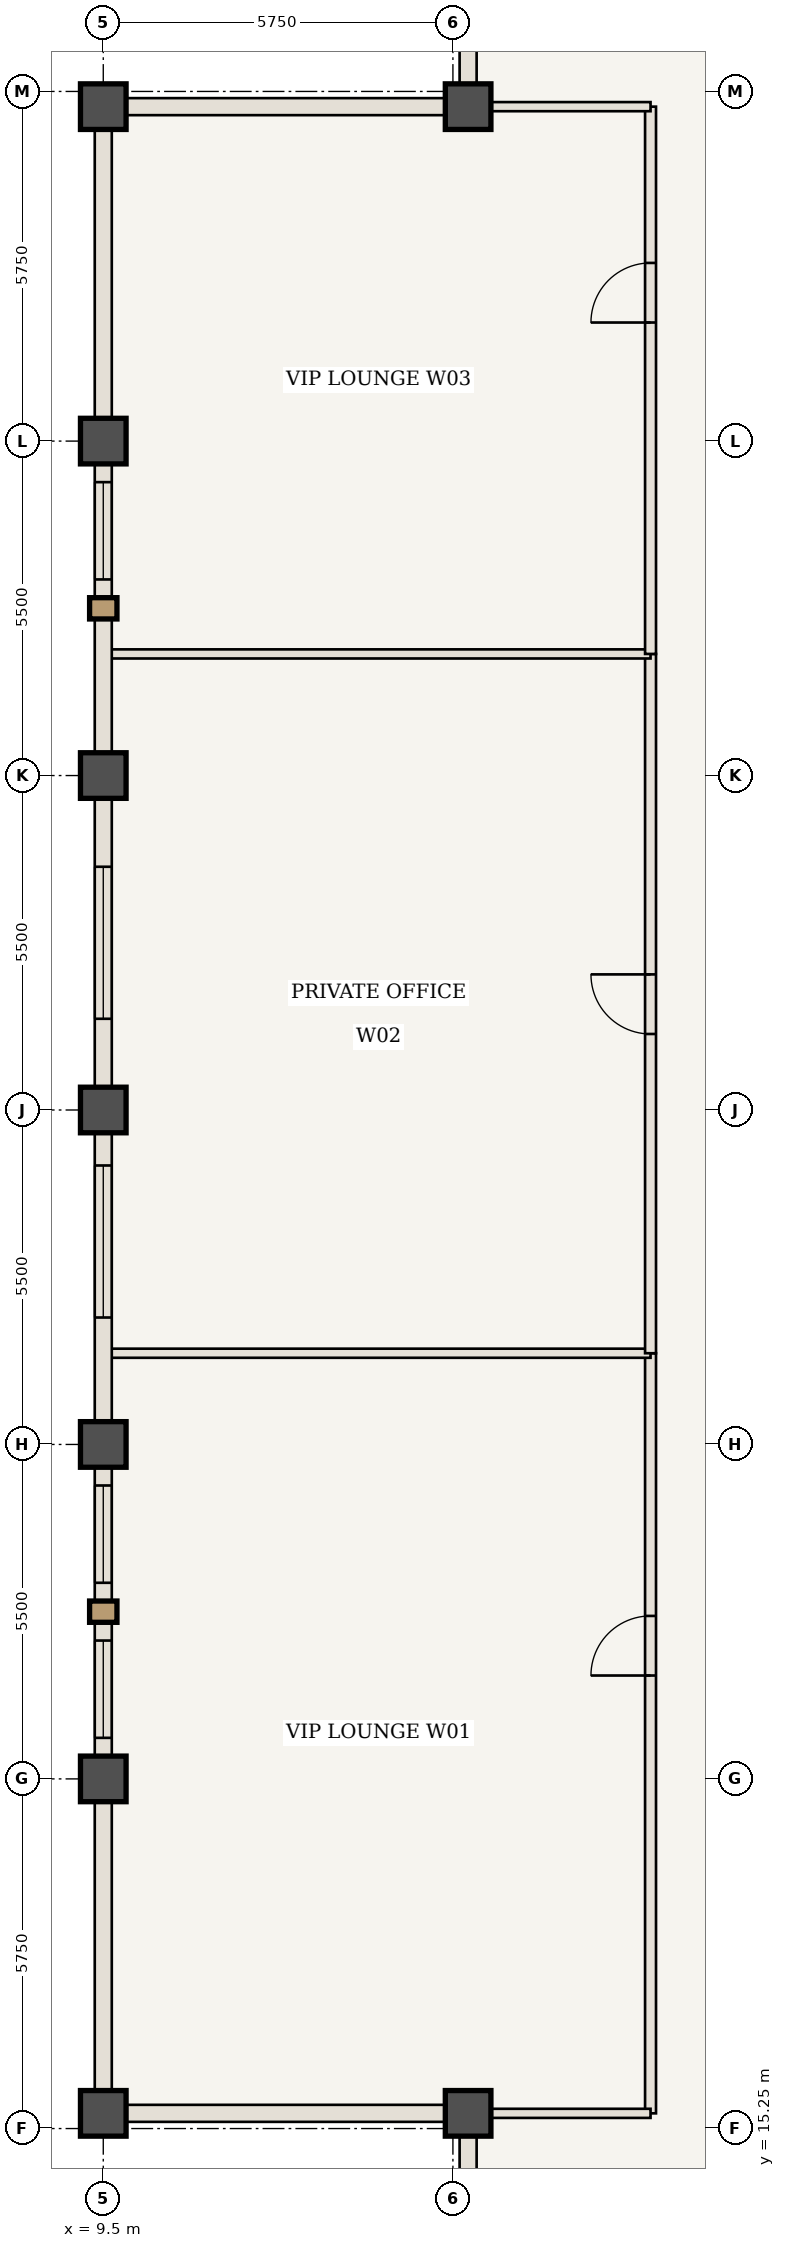
"""IFC4 building model, lengths in metres.
Left out: names, types, materials, properties, quantities, classifications, styles, units other than length and angle.
Written with IfcOpenShell. Run it as: python <this file> out.ifc"""

import sys

from ifc_helpers import new_model, si_unit, direction, frame, frame_2d, origin, origin_2d, place, context, subcontext, project, spatial, rectangle, extrude, element, fill, save


model = new_model("IFC4")
c1 = context("Model", 3, precision=1e-05, world=origin(), true_north=direction((0.0, 1.0)))
c2 = subcontext(c1, "Body", "Model", "MODEL_VIEW")
j1 = project(units=[si_unit("LENGTHUNIT", "METRE"), si_unit("PLANEANGLEUNIT", "RADIAN")], contexts=[c1])
p1 = place(None, origin())
s1 = spatial("IfcSite", under=j1, at=p1, CompositionType="ELEMENT")
p2 = place(p1, origin())
s2 = spatial("IfcBuilding", under=s1, at=p2, CompositionType="ELEMENT")
p3 = place(p2, frame((0.0, 0.0, 281.4)))
s3 = spatial("IfcBuildingStorey", under=s2, at=p3, CompositionType="ELEMENT", Elevation=281.4)
for number, where, z_axis, x_axis in (
    (1, (15.5, 15.5, 0.0), (0.0, 0.0, 1.0), (1.0, 0.0, 0.0)),
    (2, (9.5, 15.5, 0.0), (0.0, 0.0, 1.0), (1.0, 0.0, 0.0)),
    (3, (15.5, 48.5, 0.0), (0.0, 0.0, 1.0), (1.0, 0.0, 0.0)),
    (4, (9.5, 48.5, 0.0), (0.0, 0.0, 1.0), (1.0, 0.0, 0.0)),
    (5, (9.5, 21.0, 0.0), (0.0, 0.0, 1.0), (1.0, 0.0, 0.0)),
    (6, (9.5, 26.5, 0.0), (0.0, 0.0, 1.0), (1.0, 0.0, 0.0)),
    (7, (9.5, 32.0, 0.0), (0.0, 0.0, 1.0), (1.0, 0.0, 0.0)),
    (8, (9.5, 37.5, 0.0), (0.0, 0.0, 1.0), (1.0, 0.0, 0.0)),
    (9, (9.5, 43.0, 0.0), (0.0, 0.0, 1.0), (1.0, 0.0, 0.0)),
):
    element("IfcColumn", number, at=place(p3, frame(where, z_axis=z_axis, x_axis=x_axis)), inside=s3, PredefinedType="COLUMN", context=c2, shape_type="SweptSolid", body=[
        extrude(rectangle(XDim=0.75, YDim=0.75, at=origin_2d()), origin(), (0.0, 0.0, 1.0), 3.85),
    ])
p4 = place(p3, frame((18.5, 15.5, 0.0), z_axis=(0.0, 0.0, 1.0), x_axis=(0.0, 1.0, 0.0)))
e10 = element("IfcWall", 10, at=p4, inside=s3, PredefinedType="STANDARD", context=c2, shape_type="SweptSolid", body=[
    extrude(rectangle(XDim=12.5, YDim=0.18, at=frame_2d((6.25, 0.0))), origin(), (0.0, 0.0, 1.0), 3.685),
])
p5 = place(p4, frame((7.2, 0.0, 0.0)))
e11 = element("IfcOpeningElement", 11, at=p5, cuts=e10, PredefinedType="OPENING", context=c2, shape_type="SweptSolid", body=[
    extrude(rectangle(XDim=0.98, YDim=2.2, at=frame_2d((0.49, 1.1))), frame((0.0, 0.1, 0.0), z_axis=(0.0, -1.0, 0.0), x_axis=(1.0, 0.0, 0.0)), (0.0, 0.0, 1.0), 0.2),
])
p6 = place(p3, frame((9.56, 28.0, 0.0), z_axis=(0.0, 0.0, 1.0), x_axis=(1.0, 0.0, 0.0)))
e12 = element("IfcWall", 12, at=p6, inside=s3, PredefinedType="STANDARD", context=c2, shape_type="SweptSolid", body=[
    extrude(rectangle(XDim=8.94, YDim=0.15, at=frame_2d((4.47, 0.0))), origin(), (0.0, 0.0, 1.0), 3.685),
])
p7 = place(p3, frame((18.5, 28.0, 0.0), z_axis=(0.0, 0.0, 1.0), x_axis=(0.0, 1.0, 0.0)))
e13 = element("IfcWall", 13, at=p7, inside=s3, PredefinedType="STANDARD", context=c2, shape_type="SweptSolid", body=[
    extrude(rectangle(XDim=11.5, YDim=0.18, at=frame_2d((5.75, 0.0))), origin(), (0.0, 0.0, 1.0), 3.685),
])
p8 = place(p7, frame((5.25, 0.0, 0.0)))
e14 = element("IfcOpeningElement", 14, at=p8, cuts=e13, PredefinedType="OPENING", context=c2, shape_type="SweptSolid", body=[
    extrude(rectangle(XDim=0.98, YDim=2.2, at=frame_2d((0.49, 1.1))), frame((0.0, 0.1, 0.0), z_axis=(0.0, -1.0, 0.0), x_axis=(1.0, 0.0, 0.0)), (0.0, 0.0, 1.0), 0.2),
])
p9 = place(p3, frame((9.56, 39.5, 0.0), z_axis=(0.0, 0.0, 1.0), x_axis=(1.0, 0.0, 0.0)))
e15 = element("IfcWall", 15, at=p9, inside=s3, PredefinedType="STANDARD", context=c2, shape_type="SweptSolid", body=[
    extrude(rectangle(XDim=8.94, YDim=0.15, at=frame_2d((4.47, 0.0))), origin(), (0.0, 0.0, 1.0), 3.685),
])
p10 = place(p3, frame((18.5, 39.5, 0.0), z_axis=(0.0, 0.0, 1.0), x_axis=(0.0, 1.0, 0.0)))
e16 = element("IfcWall", 16, at=p10, inside=s3, PredefinedType="STANDARD", context=c2, shape_type="SweptSolid", body=[
    extrude(rectangle(XDim=9.0, YDim=0.18, at=frame_2d((4.5, 0.0))), origin(), (0.0, 0.0, 1.0), 3.685),
])
p11 = place(p10, frame((5.45, 0.0, 0.0)))
e17 = element("IfcOpeningElement", 17, at=p11, cuts=e16, PredefinedType="OPENING", context=c2, shape_type="SweptSolid", body=[
    extrude(rectangle(XDim=0.98, YDim=2.2, at=frame_2d((0.49, 1.1))), frame((0.0, 0.1, 0.0), z_axis=(0.0, -1.0, 0.0), x_axis=(1.0, 0.0, 0.0)), (0.0, 0.0, 1.0), 0.2),
])
for number, where, z_axis, x_axis in (
    (18, (15.5, 15.5, 0.0), (0.0, 0.0, 1.0), (1.0, 0.0, 0.0)),
    (19, (15.5, 48.5, 0.0), (0.0, 0.0, 1.0), (1.0, 0.0, 0.0)),
):
    element("IfcWall", number, at=place(p3, frame(where, z_axis=z_axis, x_axis=x_axis)), inside=s3, PredefinedType="STANDARD", context=c2, shape_type="SweptSolid", body=[
        extrude(rectangle(XDim=3.0, YDim=0.15, at=frame_2d((1.5, 0.0))), origin(), (0.0, 0.0, 1.0), 3.685),
    ])
p12 = place(p3, frame((9.5, 15.5, 0.0), z_axis=(0.0, 0.0, 1.0), x_axis=(0.0, 1.0, 0.0)))
e20 = element("IfcWall", 20, at=p12, inside=s3, PredefinedType="USERDEFINED", context=c2, shape_type="SweptSolid", body=[
    extrude(rectangle(XDim=5.5, YDim=0.28, at=frame_2d((2.75, 0.0))), origin(), (0.0, 0.0, 1.0), 2.985),
])
p13 = place(p3, frame((9.5, 21.0, 0.0), z_axis=(0.0, 0.0, 1.0), x_axis=(0.0, 1.0, 0.0)))
e21 = element("IfcWall", 21, at=p13, inside=s3, PredefinedType="USERDEFINED", context=c2, shape_type="SweptSolid", body=[
    extrude(rectangle(XDim=5.5, YDim=0.28, at=frame_2d((2.75, 0.0))), origin(), (0.0, 0.0, 1.0), 2.985),
])
p14 = place(p13, frame((0.675, 0.0, 0.85)))
e22 = element("IfcOpeningElement", 22, at=p14, cuts=e21, PredefinedType="OPENING", context=c2, shape_type="SweptSolid", body=[
    extrude(rectangle(XDim=1.6, YDim=1.935, at=frame_2d((0.8, 0.968))), frame((0.0, 0.15, 0.0), z_axis=(0.0, -1.0, 0.0), x_axis=(1.0, 0.0, 0.0)), (0.0, 0.0, 1.0), 0.3),
])
p15 = place(p13, frame((3.225, 0.0, 0.85)))
e23 = element("IfcOpeningElement", 23, at=p15, cuts=e21, PredefinedType="OPENING", context=c2, shape_type="SweptSolid", body=[
    extrude(rectangle(XDim=1.6, YDim=1.935, at=frame_2d((0.8, 0.968))), frame((0.0, 0.15, 0.0), z_axis=(0.0, -1.0, 0.0), x_axis=(1.0, 0.0, 0.0)), (0.0, 0.0, 1.0), 0.3),
])
p16 = place(p3, frame((9.5, 26.5, 0.0), z_axis=(0.0, 0.0, 1.0), x_axis=(0.0, 1.0, 0.0)))
e24 = element("IfcWall", 24, at=p16, inside=s3, PredefinedType="USERDEFINED", context=c2, shape_type="SweptSolid", body=[
    extrude(rectangle(XDim=5.5, YDim=0.28, at=frame_2d((2.75, 0.0))), origin(), (0.0, 0.0, 1.0), 2.985),
])
p17 = place(p16, frame((2.087, 0.0, 0.85)))
e25 = element("IfcOpeningElement", 25, at=p17, cuts=e24, PredefinedType="OPENING", context=c2, shape_type="SweptSolid", body=[
    extrude(rectangle(XDim=2.5, YDim=1.935, at=frame_2d((1.25, 0.968))), frame((0.0, 0.15, 0.0), z_axis=(0.0, -1.0, 0.0), x_axis=(1.0, 0.0, 0.0)), (0.0, 0.0, 1.0), 0.3),
])
p18 = place(p3, frame((9.5, 32.0, 0.0), z_axis=(0.0, 0.0, 1.0), x_axis=(0.0, 1.0, 0.0)))
e26 = element("IfcWall", 26, at=p18, inside=s3, PredefinedType="USERDEFINED", context=c2, shape_type="SweptSolid", body=[
    extrude(rectangle(XDim=5.5, YDim=0.28, at=frame_2d((2.75, 0.0))), origin(), (0.0, 0.0, 1.0), 2.985),
])
p19 = place(p18, frame((1.5, 0.0, 0.85)))
e27 = element("IfcOpeningElement", 27, at=p19, cuts=e26, PredefinedType="OPENING", context=c2, shape_type="SweptSolid", body=[
    extrude(rectangle(XDim=2.5, YDim=1.935, at=frame_2d((1.25, 0.968))), frame((0.0, 0.15, 0.0), z_axis=(0.0, -1.0, 0.0), x_axis=(1.0, 0.0, 0.0)), (0.0, 0.0, 1.0), 0.3),
])
p20 = place(p3, frame((9.5, 37.5, 0.0), z_axis=(0.0, 0.0, 1.0), x_axis=(0.0, 1.0, 0.0)))
e28 = element("IfcWall", 28, at=p20, inside=s3, PredefinedType="USERDEFINED", context=c2, shape_type="SweptSolid", body=[
    extrude(rectangle(XDim=5.5, YDim=0.28, at=frame_2d((2.75, 0.0))), origin(), (0.0, 0.0, 1.0), 2.985),
])
p21 = place(p20, frame((3.225, 0.0, 0.85)))
e29 = element("IfcOpeningElement", 29, at=p21, cuts=e28, PredefinedType="OPENING", context=c2, shape_type="SweptSolid", body=[
    extrude(rectangle(XDim=1.6, YDim=1.935, at=frame_2d((0.8, 0.968))), frame((0.0, 0.15, 0.0), z_axis=(0.0, -1.0, 0.0), x_axis=(1.0, 0.0, 0.0)), (0.0, 0.0, 1.0), 0.3),
])
p22 = place(p3, frame((9.5, 43.0, 0.0), z_axis=(0.0, 0.0, 1.0), x_axis=(0.0, 1.0, 0.0)))
e30 = element("IfcWall", 30, at=p22, inside=s3, PredefinedType="USERDEFINED", context=c2, shape_type="SweptSolid", body=[
    extrude(rectangle(XDim=5.5, YDim=0.28, at=frame_2d((2.75, 0.0))), origin(), (0.0, 0.0, 1.0), 2.985),
])
for number, where, z_axis, x_axis in (
    (31, (15.5, 9.5, 0.0), (0.0, 0.0, 1.0), (0.0, 1.0, 0.0)),
    (32, (15.5, 15.5, 0.0), (0.0, 0.0, 1.0), (-1.0, 0.0, 0.0)),
    (33, (15.5, 48.5, 0.0), (0.0, 0.0, 1.0), (0.0, 1.0, 0.0)),
    (34, (9.5, 48.5, 0.0), (0.0, 0.0, 1.0), (1.0, 0.0, 0.0)),
):
    element("IfcWall", number, at=place(p3, frame(where, z_axis=z_axis, x_axis=x_axis)), inside=s3, PredefinedType="USERDEFINED", context=c2, shape_type="SweptSolid", body=[
        extrude(rectangle(XDim=6.0, YDim=0.28, at=frame_2d((3.0, 0.0))), origin(), (0.0, 0.0, 1.0), 2.985),
    ])
p23 = place(p5, origin())
e35 = element("IfcDoor", 35, at=p23, inside=s3, OperationType="SINGLE_SWING_LEFT", PredefinedType="DOOR", context=c2, shape_type="SweptSolid", body=[
    extrude(rectangle(XDim=0.98, YDim=2.2, at=frame_2d((0.49, 1.1))), frame((0.0, 0.025, 0.0), z_axis=(0.0, -1.0, 0.0), x_axis=(1.0, 0.0, 0.0)), (0.0, 0.0, 1.0), 0.05),
])
fill(e11, e35)
p24 = place(p8, origin())
e36 = element("IfcDoor", 36, at=p24, inside=s3, OperationType="SINGLE_SWING_RIGHT", PredefinedType="DOOR", context=c2, shape_type="SweptSolid", body=[
    extrude(rectangle(XDim=0.98, YDim=2.2, at=frame_2d((0.49, 1.1))), frame((0.0, 0.025, 0.0), z_axis=(0.0, -1.0, 0.0), x_axis=(1.0, 0.0, 0.0)), (0.0, 0.0, 1.0), 0.05),
])
fill(e14, e36)
p25 = place(p11, origin())
e37 = element("IfcDoor", 37, at=p25, inside=s3, OperationType="SINGLE_SWING_LEFT", PredefinedType="DOOR", context=c2, shape_type="SweptSolid", body=[
    extrude(rectangle(XDim=0.98, YDim=2.2, at=frame_2d((0.49, 1.1))), frame((0.0, 0.025, 0.0), z_axis=(0.0, -1.0, 0.0), x_axis=(1.0, 0.0, 0.0)), (0.0, 0.0, 1.0), 0.05),
])
fill(e17, e37)
p26 = place(p14, origin())
e38 = element("IfcWindow", 38, at=p26, inside=s3, PartitioningType="SINGLE_PANEL", PredefinedType="WINDOW", context=c2, shape_type="SweptSolid", body=[
    extrude(rectangle(XDim=1.6, YDim=1.935, at=frame_2d((0.8, 0.968))), frame((0.0, 0.03, 0.0), z_axis=(0.0, -1.0, 0.0), x_axis=(1.0, 0.0, 0.0)), (0.0, 0.0, 1.0), 0.06),
])
fill(e22, e38)
p27 = place(p15, origin())
e39 = element("IfcWindow", 39, at=p27, inside=s3, PartitioningType="SINGLE_PANEL", PredefinedType="WINDOW", context=c2, shape_type="SweptSolid", body=[
    extrude(rectangle(XDim=1.6, YDim=1.935, at=frame_2d((0.8, 0.968))), frame((0.0, 0.03, 0.0), z_axis=(0.0, -1.0, 0.0), x_axis=(1.0, 0.0, 0.0)), (0.0, 0.0, 1.0), 0.06),
])
fill(e23, e39)
p28 = place(p17, origin())
e40 = element("IfcWindow", 40, at=p28, inside=s3, PartitioningType="SINGLE_PANEL", PredefinedType="WINDOW", context=c2, shape_type="SweptSolid", body=[
    extrude(rectangle(XDim=2.5, YDim=1.935, at=frame_2d((1.25, 0.968))), frame((0.0, 0.03, 0.0), z_axis=(0.0, -1.0, 0.0), x_axis=(1.0, 0.0, 0.0)), (0.0, 0.0, 1.0), 0.06),
])
fill(e25, e40)
p29 = place(p19, origin())
e41 = element("IfcWindow", 41, at=p29, inside=s3, PartitioningType="SINGLE_PANEL", PredefinedType="WINDOW", context=c2, shape_type="SweptSolid", body=[
    extrude(rectangle(XDim=2.5, YDim=1.935, at=frame_2d((1.25, 0.968))), frame((0.0, 0.03, 0.0), z_axis=(0.0, -1.0, 0.0), x_axis=(1.0, 0.0, 0.0)), (0.0, 0.0, 1.0), 0.06),
])
fill(e27, e41)
p30 = place(p21, origin())
e42 = element("IfcWindow", 42, at=p30, inside=s3, PartitioningType="SINGLE_PANEL", PredefinedType="WINDOW", context=c2, shape_type="SweptSolid", body=[
    extrude(rectangle(XDim=1.6, YDim=1.935, at=frame_2d((0.8, 0.968))), frame((0.0, 0.03, 0.0), z_axis=(0.0, -1.0, 0.0), x_axis=(1.0, 0.0, 0.0)), (0.0, 0.0, 1.0), 0.06),
])
fill(e29, e42)
save(model, sys.argv[1])
